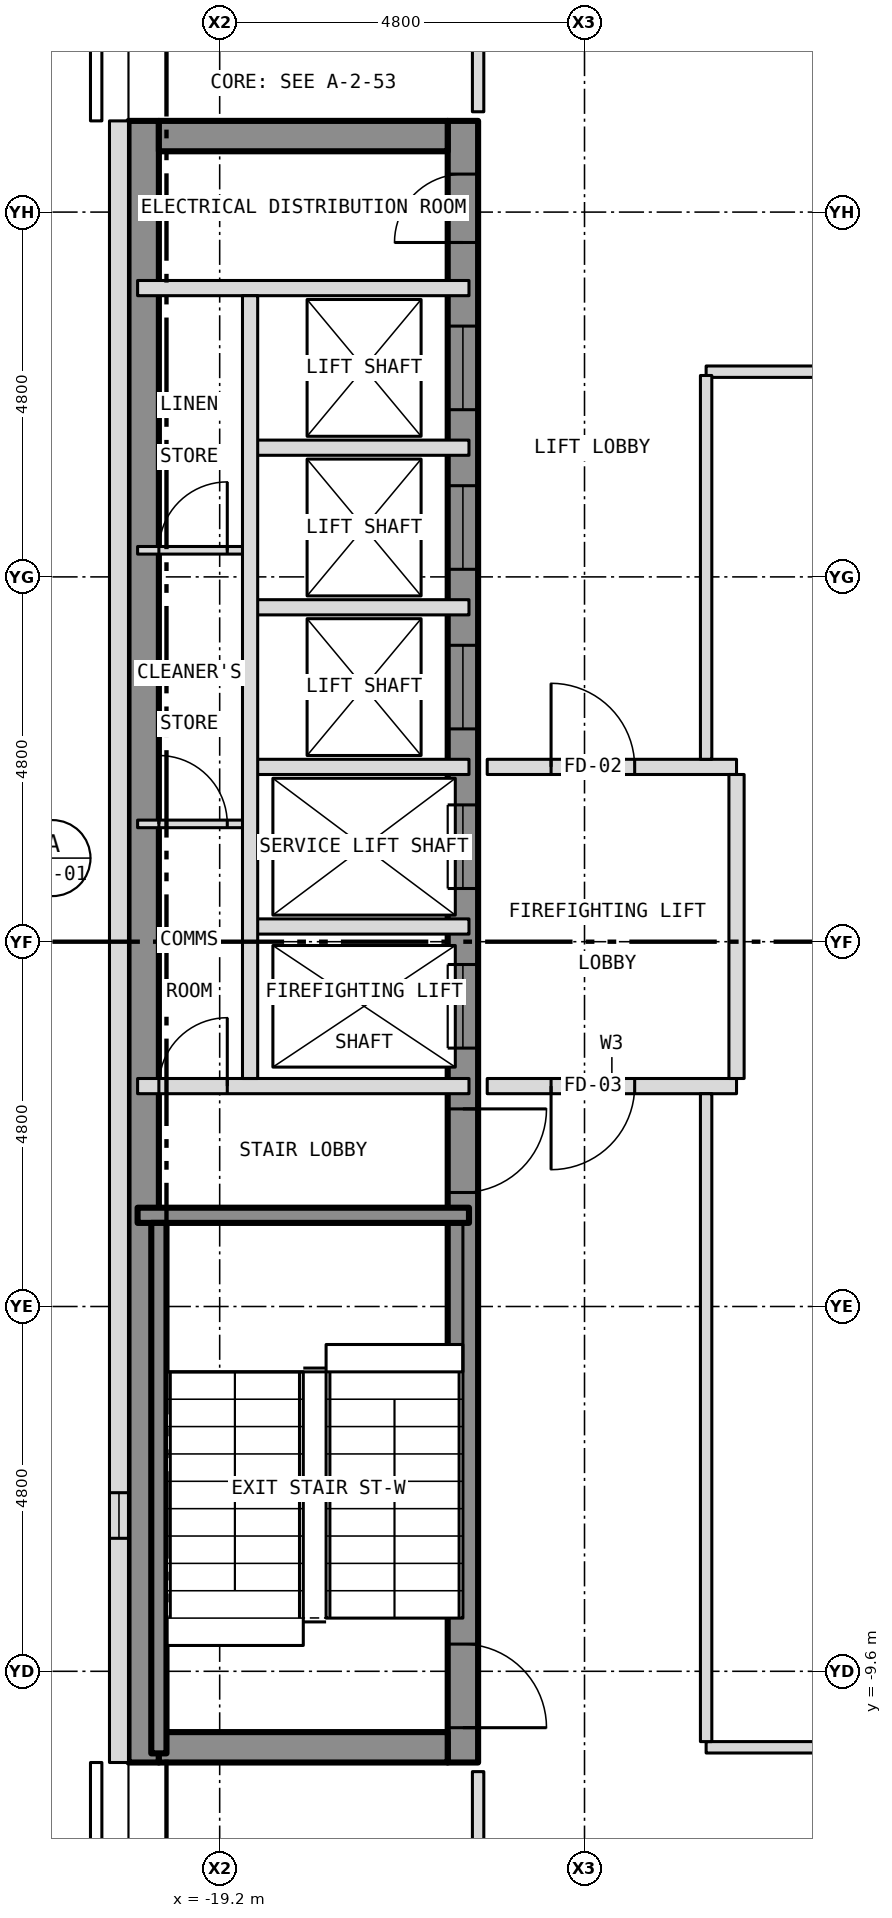
"""IFC4 building model, lengths in metres.
Left out: names, types, materials, properties, quantities, classifications, styles, units other than length and angle.
Written with IfcOpenShell. Run it as: python <this file> out.ifc"""

import sys

from ifc_helpers import new_model, si_unit, direction, frame, frame_2d, origin, place, context, subcontext, project, spatial, rectangle, extrude, element, fill, save


model = new_model("IFC4")
c1 = context("Model", 3, precision=1e-05, world=origin(), true_north=direction((0.0, 1.0)))
c2 = subcontext(c1, "Body", "Model", "MODEL_VIEW")
j1 = project(units=[si_unit("LENGTHUNIT", "METRE"), si_unit("PLANEANGLEUNIT", "RADIAN")], contexts=[c1])
p1 = place(None, origin())
s1 = spatial("IfcSite", under=j1, at=p1, CompositionType="ELEMENT")
p2 = place(p1, origin())
s2 = spatial("IfcBuilding", under=s1, at=p2, CompositionType="ELEMENT")
p3 = place(p2, frame((0.0, 0.0, 194.5)))
s3 = spatial("IfcBuildingStorey", under=s2, at=p3, CompositionType="ELEMENT", Elevation=194.5)
p4 = place(p3, frame((-16.0, -10.8, 0.0), z_axis=(0.0, 0.0, 1.0), x_axis=(0.0, 1.0, 0.0)))
e1 = element("IfcWall", 1, at=p4, inside=s3, PredefinedType="SHEAR", context=c2, shape_type="SweptSolid", body=[
    extrude(rectangle(XDim=21.6, YDim=0.4, at=frame_2d((10.8, 0.0))), origin(), (0.0, 0.0, 1.0), 3.25),
])
p5 = place(p4, frame((9.4, 0.0, 0.0)))
e2 = element("IfcOpeningElement", 2, at=p5, cuts=e1, PredefinedType="OPENING", context=c2, shape_type="SweptSolid", body=[
    extrude(rectangle(XDim=1.1, YDim=2.1, at=frame_2d((0.55, 1.05))), frame((0.0, 0.212, 0.0), z_axis=(0.0, -1.0, 0.0), x_axis=(1.0, 0.0, 0.0)), (0.0, 0.0, 1.0), 0.424),
])
p6 = place(p4, frame((11.5, 0.0, 0.0)))
e3 = element("IfcOpeningElement", 3, at=p6, cuts=e1, PredefinedType="OPENING", context=c2, shape_type="SweptSolid", body=[
    extrude(rectangle(XDim=1.1, YDim=2.1, at=frame_2d((0.55, 1.05))), frame((0.0, 0.212, 0.0), z_axis=(0.0, -1.0, 0.0), x_axis=(1.0, 0.0, 0.0)), (0.0, 0.0, 1.0), 0.424),
])
p7 = place(p4, frame((13.6, 0.0, 0.0)))
e4 = element("IfcOpeningElement", 4, at=p7, cuts=e1, PredefinedType="OPENING", context=c2, shape_type="SweptSolid", body=[
    extrude(rectangle(XDim=1.1, YDim=2.1, at=frame_2d((0.55, 1.05))), frame((0.0, 0.212, 0.0), z_axis=(0.0, -1.0, 0.0), x_axis=(1.0, 0.0, 0.0)), (0.0, 0.0, 1.0), 0.424),
])
p8 = place(p4, frame((15.7, 0.0, 0.0)))
e5 = element("IfcOpeningElement", 5, at=p8, cuts=e1, PredefinedType="OPENING", context=c2, shape_type="SweptSolid", body=[
    extrude(rectangle(XDim=1.1, YDim=2.1, at=frame_2d((0.55, 1.05))), frame((0.0, 0.212, 0.0), z_axis=(0.0, -1.0, 0.0), x_axis=(1.0, 0.0, 0.0)), (0.0, 0.0, 1.0), 0.424),
])
p9 = place(p4, frame((17.8, 0.0, 0.0)))
e6 = element("IfcOpeningElement", 6, at=p9, cuts=e1, PredefinedType="OPENING", context=c2, shape_type="SweptSolid", body=[
    extrude(rectangle(XDim=1.1, YDim=2.1, at=frame_2d((0.55, 1.05))), frame((0.0, 0.212, 0.0), z_axis=(0.0, -1.0, 0.0), x_axis=(1.0, 0.0, 0.0)), (0.0, 0.0, 1.0), 0.424),
])
p10 = place(p4, frame((0.458, 0.0, 0.0)))
e7 = element("IfcOpeningElement", 7, at=p10, cuts=e1, PredefinedType="OPENING", context=c2, shape_type="SweptSolid", body=[
    extrude(rectangle(XDim=1.1, YDim=2.1, at=frame_2d((0.55, 1.05))), frame((0.0, 0.212, 0.0), z_axis=(0.0, -1.0, 0.0), x_axis=(1.0, 0.0, 0.0)), (0.0, 0.0, 1.0), 0.424),
])
p11 = place(p4, frame((7.5, 0.0, 0.0)))
e8 = element("IfcOpeningElement", 8, at=p11, cuts=e1, PredefinedType="OPENING", context=c2, shape_type="SweptSolid", body=[
    extrude(rectangle(XDim=1.1, YDim=2.1, at=frame_2d((0.55, 1.05))), frame((0.0, 0.212, 0.0), z_axis=(0.0, -1.0, 0.0), x_axis=(1.0, 0.0, 0.0)), (0.0, 0.0, 1.0), 0.424),
])
p12 = place(p4, frame((20.0, 0.0, 0.0)))
e9 = element("IfcOpeningElement", 9, at=p12, cuts=e1, PredefinedType="OPENING", context=c2, shape_type="SweptSolid", body=[
    extrude(rectangle(XDim=0.9, YDim=2.1, at=frame_2d((0.45, 1.05))), frame((0.0, 0.212, 0.0), z_axis=(0.0, -1.0, 0.0), x_axis=(1.0, 0.0, 0.0)), (0.0, 0.0, 1.0), 0.424),
])
p13 = place(p3, frame((-20.2, -10.8, 0.0), z_axis=(0.0, 0.0, 1.0), x_axis=(0.0, 1.0, 0.0)))
e10 = element("IfcWall", 10, at=p13, inside=s3, PredefinedType="SHEAR", context=c2, shape_type="SweptSolid", body=[
    extrude(rectangle(XDim=21.6, YDim=0.4, at=frame_2d((10.8, 0.0))), origin(), (0.0, 0.0, 1.0), 3.25),
])
for number, where, z_axis, x_axis in (
    (11, (-20.0, 10.6, 0.0), (0.0, 0.0, 1.0), (1.0, 0.0, 0.0)),
    (12, (-20.0, -10.6, 0.0), (0.0, 0.0, 1.0), (1.0, 0.0, 0.0)),
):
    element("IfcWall", number, at=place(p3, frame(where, z_axis=z_axis, x_axis=x_axis)), inside=s3, PredefinedType="SHEAR", context=c2, shape_type="SweptSolid", body=[
        extrude(rectangle(XDim=3.8, YDim=0.4, at=frame_2d((1.9, 0.0))), origin(), (0.0, 0.0, 1.0), 3.25),
    ])
p14 = place(p3, frame((-20.525, 10.8, 0.0), z_axis=(0.0, 0.0, 1.0), x_axis=(0.0, -1.0, 0.0)))
e13 = element("IfcWall", 13, at=p14, inside=s3, PredefinedType="SOLIDWALL", context=c2, shape_type="SweptSolid", body=[
    extrude(rectangle(XDim=21.6, YDim=0.25, at=frame_2d((10.8, 0.0))), origin(), (0.0, 0.0, 1.0), 3.5),
])
p15 = place(p14, frame((18.05, 0.0, 1.0)))
e14 = element("IfcOpeningElement", 14, at=p15, cuts=e13, PredefinedType="OPENING", context=c2, shape_type="SweptSolid", body=[
    extrude(rectangle(XDim=0.6, YDim=1.5, at=frame_2d((0.3, 0.75))), frame((0.0, 0.137, 0.0), z_axis=(0.0, -1.0, 0.0), x_axis=(1.0, 0.0, 0.0)), (0.0, 0.0, 1.0), 0.274),
])
p16 = place(p3, frame((-12.8, -10.6, 0.0), z_axis=(0.0, 0.0, 1.0), x_axis=(1.0, 0.0, 0.0)))
e15 = element("IfcWall", 15, at=p16, inside=s3, PredefinedType="PARTITIONING", context=c2, shape_type="SweptSolid", body=[
    extrude(rectangle(XDim=20.3, YDim=0.15, at=frame_2d((10.15, 0.0))), origin(), (0.0, 0.0, 1.0), 3.35),
])
p17 = place(p3, frame((-20.28, -3.6, 0.0), z_axis=(0.0, 0.0, 1.0), x_axis=(1.0, 0.0, 0.0)))
e16 = element("IfcWall", 16, at=p17, inside=s3, PredefinedType="SHEAR", context=c2, shape_type="SweptSolid", body=[
    extrude(rectangle(XDim=4.36, YDim=0.2, at=frame_2d((2.18, 0.0))), origin(), (0.0, 0.0, 1.0), 3.25),
])
p18 = place(p3, frame((-20.28, -1.9, 0.0), z_axis=(0.0, 0.0, 1.0), x_axis=(1.0, 0.0, 0.0)))
e17 = element("IfcWall", 17, at=p18, inside=s3, PredefinedType="PARTITIONING", context=c2, shape_type="SweptSolid", body=[
    extrude(rectangle(XDim=4.36, YDim=0.2, at=frame_2d((2.18, 0.0))), origin(), (0.0, 0.0, 1.0), 3.25),
])
p19 = place(p18, frame((0.28, 0.0, 0.0)))
e18 = element("IfcOpeningElement", 18, at=p19, cuts=e17, PredefinedType="OPENING", context=c2, shape_type="SweptSolid", body=[
    extrude(rectangle(XDim=0.9, YDim=2.1, at=frame_2d((0.45, 1.05))), frame((0.0, 0.112, 0.0), z_axis=(0.0, -1.0, 0.0), x_axis=(1.0, 0.0, 0.0)), (0.0, 0.0, 1.0), 0.224),
])
p20 = place(p3, frame((-15.68, -1.9, 0.0), z_axis=(0.0, 0.0, 1.0), x_axis=(1.0, 0.0, 0.0)))
e19 = element("IfcWall", 19, at=p20, inside=s3, PredefinedType="PARTITIONING", context=c2, shape_type="SweptSolid", body=[
    extrude(rectangle(XDim=3.28, YDim=0.2, at=frame_2d((1.64, 0.0))), origin(), (0.0, 0.0, 1.0), 3.35),
])
p21 = place(p20, frame((0.84, 0.0, 0.0)))
e20 = element("IfcOpeningElement", 20, at=p21, cuts=e19, PredefinedType="OPENING", context=c2, shape_type="SweptSolid", body=[
    extrude(rectangle(XDim=1.1, YDim=2.1, at=frame_2d((0.55, 1.05))), frame((0.0, 0.112, 0.0), z_axis=(0.0, -1.0, 0.0), x_axis=(1.0, 0.0, 0.0)), (0.0, 0.0, 1.0), 0.224),
])
p22 = place(p3, frame((-18.8, 0.2, 0.0), z_axis=(0.0, 0.0, 1.0), x_axis=(1.0, 0.0, 0.0)))
e21 = element("IfcWall", 21, at=p22, inside=s3, PredefinedType="PARTITIONING", context=c2, shape_type="SweptSolid", body=[
    extrude(rectangle(XDim=2.88, YDim=0.2, at=frame_2d((1.44, 0.0))), origin(), (0.0, 0.0, 1.0), 3.25),
])
p23 = place(p3, frame((-20.28, 1.55, 0.0), z_axis=(0.0, 0.0, 1.0), x_axis=(1.0, 0.0, 0.0)))
e22 = element("IfcWall", 22, at=p23, inside=s3, PredefinedType="PARTITIONING", context=c2, shape_type="SweptSolid", body=[
    extrude(rectangle(XDim=1.48, YDim=0.1, at=frame_2d((0.74, 0.0))), origin(), (0.0, 0.0, 1.0), 3.25),
])
p24 = place(p23, frame((0.28, 0.0, 0.0)))
e23 = element("IfcOpeningElement", 23, at=p24, cuts=e22, PredefinedType="OPENING", context=c2, shape_type="SweptSolid", body=[
    extrude(rectangle(XDim=0.9, YDim=2.1, at=frame_2d((0.45, 1.05))), frame((0.0, 0.062, 0.0), z_axis=(0.0, -1.0, 0.0), x_axis=(1.0, 0.0, 0.0)), (0.0, 0.0, 1.0), 0.124),
])
p25 = place(p3, frame((-18.8, 2.3, 0.0), z_axis=(0.0, 0.0, 1.0), x_axis=(1.0, 0.0, 0.0)))
e24 = element("IfcWall", 24, at=p25, inside=s3, PredefinedType="PARTITIONING", context=c2, shape_type="SweptSolid", body=[
    extrude(rectangle(XDim=2.88, YDim=0.2, at=frame_2d((1.44, 0.0))), origin(), (0.0, 0.0, 1.0), 3.25),
])
p26 = place(p3, frame((-15.68, 2.3, 0.0), z_axis=(0.0, 0.0, 1.0), x_axis=(1.0, 0.0, 0.0)))
e25 = element("IfcWall", 25, at=p26, inside=s3, PredefinedType="PARTITIONING", context=c2, shape_type="SweptSolid", body=[
    extrude(rectangle(XDim=3.28, YDim=0.2, at=frame_2d((1.64, 0.0))), origin(), (0.0, 0.0, 1.0), 3.35),
])
p27 = place(p26, frame((0.84, 0.0, 0.0)))
e26 = element("IfcOpeningElement", 26, at=p27, cuts=e25, PredefinedType="OPENING", context=c2, shape_type="SweptSolid", body=[
    extrude(rectangle(XDim=1.1, YDim=2.1, at=frame_2d((0.55, 1.05))), frame((0.0, 0.112, 0.0), z_axis=(0.0, -1.0, 0.0), x_axis=(1.0, 0.0, 0.0)), (0.0, 0.0, 1.0), 0.224),
])
p28 = place(p3, frame((-18.8, 4.4, 0.0), z_axis=(0.0, 0.0, 1.0), x_axis=(1.0, 0.0, 0.0)))
e27 = element("IfcWall", 27, at=p28, inside=s3, PredefinedType="PARTITIONING", context=c2, shape_type="SweptSolid", body=[
    extrude(rectangle(XDim=2.88, YDim=0.2, at=frame_2d((1.44, 0.0))), origin(), (0.0, 0.0, 1.0), 3.25),
])
p29 = place(p3, frame((-20.28, 5.15, 0.0), z_axis=(0.0, 0.0, 1.0), x_axis=(1.0, 0.0, 0.0)))
e28 = element("IfcWall", 28, at=p29, inside=s3, PredefinedType="PARTITIONING", context=c2, shape_type="SweptSolid", body=[
    extrude(rectangle(XDim=1.48, YDim=0.1, at=frame_2d((0.74, 0.0))), origin(), (0.0, 0.0, 1.0), 3.25),
])
p30 = place(p29, frame((0.28, 0.0, 0.0)))
e29 = element("IfcOpeningElement", 29, at=p30, cuts=e28, PredefinedType="OPENING", context=c2, shape_type="SweptSolid", body=[
    extrude(rectangle(XDim=0.9, YDim=2.1, at=frame_2d((0.45, 1.05))), frame((0.0, 0.062, 0.0), z_axis=(0.0, -1.0, 0.0), x_axis=(1.0, 0.0, 0.0)), (0.0, 0.0, 1.0), 0.124),
])
p31 = place(p3, frame((-18.8, 6.5, 0.0), z_axis=(0.0, 0.0, 1.0), x_axis=(1.0, 0.0, 0.0)))
e30 = element("IfcWall", 30, at=p31, inside=s3, PredefinedType="PARTITIONING", context=c2, shape_type="SweptSolid", body=[
    extrude(rectangle(XDim=2.88, YDim=0.2, at=frame_2d((1.44, 0.0))), origin(), (0.0, 0.0, 1.0), 3.25),
])
p32 = place(p3, frame((-12.8, 7.5, 0.0), z_axis=(0.0, 0.0, 1.0), x_axis=(1.0, 0.0, 0.0)))
e31 = element("IfcWall", 31, at=p32, inside=s3, PredefinedType="PARTITIONING", context=c2, shape_type="SweptSolid", body=[
    extrude(rectangle(XDim=20.3, YDim=0.15, at=frame_2d((10.15, 0.0))), origin(), (0.0, 0.0, 1.0), 3.35),
])
p33 = place(p32, frame((5.95, 0.0, 0.0)))
e32 = element("IfcOpeningElement", 32, at=p33, cuts=e31, PredefinedType="OPENING", context=c2, shape_type="SweptSolid", body=[
    extrude(rectangle(XDim=0.9, YDim=2.1, at=frame_2d((0.45, 1.05))), frame((0.0, 0.087, 0.0), z_axis=(0.0, -1.0, 0.0), x_axis=(1.0, 0.0, 0.0)), (0.0, 0.0, 1.0), 0.174),
])
p34 = place(p3, frame((-20.28, 8.6, 0.0), z_axis=(0.0, 0.0, 1.0), x_axis=(1.0, 0.0, 0.0)))
e33 = element("IfcWall", 33, at=p34, inside=s3, PredefinedType="PARTITIONING", context=c2, shape_type="SweptSolid", body=[
    extrude(rectangle(XDim=4.36, YDim=0.2, at=frame_2d((2.18, 0.0))), origin(), (0.0, 0.0, 1.0), 3.25),
])
p35 = place(p3, frame((-20.0, -10.68, 0.0), z_axis=(0.0, 0.0, 1.0), x_axis=(0.0, 1.0, 0.0)))
e34 = element("IfcWall", 34, at=p35, inside=s3, PredefinedType="SHEAR", context=c2, shape_type="SweptSolid", body=[
    extrude(rectangle(XDim=6.98, YDim=0.2, at=frame_2d((3.49, 0.0))), origin(), (0.0, 0.0, 1.0), 3.25),
])
p36 = place(p3, frame((-18.8, -1.8, 0.0), z_axis=(0.0, 0.0, 1.0), x_axis=(0.0, 1.0, 0.0)))
e35 = element("IfcWall", 35, at=p36, inside=s3, PredefinedType="PARTITIONING", context=c2, shape_type="SweptSolid", body=[
    extrude(rectangle(XDim=10.3, YDim=0.2, at=frame_2d((5.15, 0.0))), origin(), (0.0, 0.0, 1.0), 3.25),
])
for number, where, z_axis, x_axis in (
    (36, (-15.8, -12.725, 0.0), (0.0, 0.0, 1.0), (0.0, 1.0, 0.0)),
    (37, (-15.8, 10.92, 0.0), (0.0, 0.0, 1.0), (0.0, 1.0, 0.0)),
):
    element("IfcWall", number, at=place(p3, frame(where, z_axis=z_axis, x_axis=x_axis)), inside=s3, PredefinedType="PARTITIONING", context=c2, shape_type="SweptSolid", body=[
        extrude(rectangle(XDim=1.805, YDim=0.15, at=frame_2d((0.903, 0.0))), origin(), (0.0, 0.0, 1.0), 3.35),
    ])
p37 = place(p3, frame((-12.8, -10.525, 0.0), z_axis=(0.0, 0.0, 1.0), x_axis=(0.0, 1.0, 0.0)))
e38 = element("IfcWall", 38, at=p37, inside=s3, PredefinedType="PARTITIONING", context=c2, shape_type="SweptSolid", body=[
    extrude(rectangle(XDim=8.525, YDim=0.15, at=frame_2d((4.262, 0.0))), origin(), (0.0, 0.0, 1.0), 3.35),
])
p38 = place(p3, frame((-12.8, 2.4, 0.0), z_axis=(0.0, 0.0, 1.0), x_axis=(0.0, 1.0, 0.0)))
e39 = element("IfcWall", 39, at=p38, inside=s3, PredefinedType="PARTITIONING", context=c2, shape_type="SweptSolid", body=[
    extrude(rectangle(XDim=5.05, YDim=0.15, at=frame_2d((2.525, 0.0))), origin(), (0.0, 0.0, 1.0), 3.35),
])
p39 = place(p3, frame((-12.4, -1.8, 0.0), z_axis=(0.0, 0.0, 1.0), x_axis=(0.0, 1.0, 0.0)))
e40 = element("IfcWall", 40, at=p39, inside=s3, PredefinedType="PARTITIONING", context=c2, shape_type="SweptSolid", body=[
    extrude(rectangle(XDim=4.0, YDim=0.2, at=frame_2d((2.0, 0.0))), origin(), (0.0, 0.0, 1.0), 3.35),
])
p40 = place(p15, origin())
e41 = element("IfcWindow", 41, at=p40, inside=s3, PartitioningType="SINGLE_PANEL", PredefinedType="WINDOW", context=c2, shape_type="SweptSolid", body=[
    extrude(rectangle(XDim=0.6, YDim=1.5, at=frame_2d((0.3, 0.75))), frame((0.0, -0.035, 0.0), z_axis=(0.0, -1.0, 0.0), x_axis=(1.0, 0.0, 0.0)), (0.0, 0.0, 1.0), 0.06),
])
fill(e14, e41)
p41 = place(p5, origin())
e42 = element("IfcDoor", 42, at=p41, inside=s3, OperationType="SLIDING_TO_LEFT", PredefinedType="DOOR", context=c2, shape_type="SweptSolid", body=[
    extrude(rectangle(XDim=1.1, YDim=2.1, at=frame_2d((0.55, 1.05))), frame((0.0, 0.025, 0.0), z_axis=(0.0, -1.0, 0.0), x_axis=(1.0, 0.0, 0.0)), (0.0, 0.0, 1.0), 0.05),
])
fill(e2, e42)
p42 = place(p6, origin())
e43 = element("IfcDoor", 43, at=p42, inside=s3, OperationType="SLIDING_TO_LEFT", PredefinedType="DOOR", context=c2, shape_type="SweptSolid", body=[
    extrude(rectangle(XDim=1.1, YDim=2.1, at=frame_2d((0.55, 1.05))), frame((0.0, 0.025, 0.0), z_axis=(0.0, -1.0, 0.0), x_axis=(1.0, 0.0, 0.0)), (0.0, 0.0, 1.0), 0.05),
])
fill(e3, e43)
p43 = place(p7, origin())
e44 = element("IfcDoor", 44, at=p43, inside=s3, OperationType="SLIDING_TO_LEFT", PredefinedType="DOOR", context=c2, shape_type="SweptSolid", body=[
    extrude(rectangle(XDim=1.1, YDim=2.1, at=frame_2d((0.55, 1.05))), frame((0.0, 0.025, 0.0), z_axis=(0.0, -1.0, 0.0), x_axis=(1.0, 0.0, 0.0)), (0.0, 0.0, 1.0), 0.05),
])
fill(e4, e44)
p44 = place(p8, origin())
e45 = element("IfcDoor", 45, at=p44, inside=s3, OperationType="SLIDING_TO_LEFT", PredefinedType="DOOR", context=c2, shape_type="SweptSolid", body=[
    extrude(rectangle(XDim=1.1, YDim=2.1, at=frame_2d((0.55, 1.05))), frame((0.0, 0.025, 0.0), z_axis=(0.0, -1.0, 0.0), x_axis=(1.0, 0.0, 0.0)), (0.0, 0.0, 1.0), 0.05),
])
fill(e5, e45)
p45 = place(p9, origin())
e46 = element("IfcDoor", 46, at=p45, inside=s3, OperationType="SLIDING_TO_LEFT", PredefinedType="DOOR", context=c2, shape_type="SweptSolid", body=[
    extrude(rectangle(XDim=1.1, YDim=2.1, at=frame_2d((0.55, 1.05))), frame((0.0, 0.025, 0.0), z_axis=(0.0, -1.0, 0.0), x_axis=(1.0, 0.0, 0.0)), (0.0, 0.0, 1.0), 0.05),
])
fill(e6, e46)
p46 = place(p10, origin())
e47 = element("IfcDoor", 47, at=p46, inside=s3, OperationType="SINGLE_SWING_LEFT", PredefinedType="DOOR", context=c2, shape_type="SweptSolid", body=[
    extrude(rectangle(XDim=1.1, YDim=2.1, at=frame_2d((0.55, 1.05))), frame((0.0, 0.025, 0.0), z_axis=(0.0, -1.0, 0.0), x_axis=(1.0, 0.0, 0.0)), (0.0, 0.0, 1.0), 0.05),
])
fill(e7, e47)
p47 = place(p11, origin())
e48 = element("IfcDoor", 48, at=p47, inside=s3, OperationType="SINGLE_SWING_RIGHT", PredefinedType="DOOR", context=c2, shape_type="SweptSolid", body=[
    extrude(rectangle(XDim=1.1, YDim=2.1, at=frame_2d((0.55, 1.05))), frame((0.0, 0.025, 0.0), z_axis=(0.0, -1.0, 0.0), x_axis=(1.0, 0.0, 0.0)), (0.0, 0.0, 1.0), 0.05),
])
fill(e8, e48)
p48 = place(p12, origin())
e49 = element("IfcDoor", 49, at=p48, inside=s3, OperationType="SINGLE_SWING_LEFT", PredefinedType="DOOR", context=c2, shape_type="SweptSolid", body=[
    extrude(rectangle(XDim=0.9, YDim=2.1, at=frame_2d((0.45, 1.05))), frame((0.0, 0.025, 0.0), z_axis=(0.0, -1.0, 0.0), x_axis=(1.0, 0.0, 0.0)), (0.0, 0.0, 1.0), 0.05),
])
fill(e9, e49)
p49 = place(p19, origin())
e50 = element("IfcDoor", 50, at=p49, inside=s3, OperationType="SINGLE_SWING_RIGHT", PredefinedType="DOOR", context=c2, shape_type="SweptSolid", body=[
    extrude(rectangle(XDim=0.9, YDim=2.1, at=frame_2d((0.45, 1.05))), frame((0.0, 0.025, 0.0), z_axis=(0.0, -1.0, 0.0), x_axis=(1.0, 0.0, 0.0)), (0.0, 0.0, 1.0), 0.05),
])
fill(e18, e50)
p50 = place(p24, origin())
e51 = element("IfcDoor", 51, at=p50, inside=s3, OperationType="SINGLE_SWING_LEFT", PredefinedType="DOOR", context=c2, shape_type="SweptSolid", body=[
    extrude(rectangle(XDim=0.9, YDim=2.1, at=frame_2d((0.45, 1.05))), frame((0.0, 0.025, 0.0), z_axis=(0.0, -1.0, 0.0), x_axis=(1.0, 0.0, 0.0)), (0.0, 0.0, 1.0), 0.05),
])
fill(e23, e51)
p51 = place(p30, origin())
e52 = element("IfcDoor", 52, at=p51, inside=s3, OperationType="SINGLE_SWING_RIGHT", PredefinedType="DOOR", context=c2, shape_type="SweptSolid", body=[
    extrude(rectangle(XDim=0.9, YDim=2.1, at=frame_2d((0.45, 1.05))), frame((0.0, 0.025, 0.0), z_axis=(0.0, -1.0, 0.0), x_axis=(1.0, 0.0, 0.0)), (0.0, 0.0, 1.0), 0.05),
])
fill(e29, e52)
p52 = place(p27, origin())
e53 = element("IfcDoor", 53, at=p52, inside=s3, OperationType="SINGLE_SWING_LEFT", PredefinedType="DOOR", context=c2, shape_type="SweptSolid", body=[
    extrude(rectangle(XDim=1.1, YDim=2.1, at=frame_2d((0.55, 1.05))), frame((0.0, 0.025, 0.0), z_axis=(0.0, -1.0, 0.0), x_axis=(1.0, 0.0, 0.0)), (0.0, 0.0, 1.0), 0.05),
])
fill(e26, e53)
p53 = place(p21, origin())
e54 = element("IfcDoor", 54, at=p53, inside=s3, OperationType="SINGLE_SWING_LEFT", PredefinedType="DOOR", context=c2, shape_type="SweptSolid", body=[
    extrude(rectangle(XDim=1.1, YDim=2.1, at=frame_2d((0.55, 1.05))), frame((0.0, 0.025, 0.0), z_axis=(0.0, -1.0, 0.0), x_axis=(1.0, 0.0, 0.0)), (0.0, 0.0, 1.0), 0.05),
])
fill(e20, e54)
save(model, sys.argv[1])
